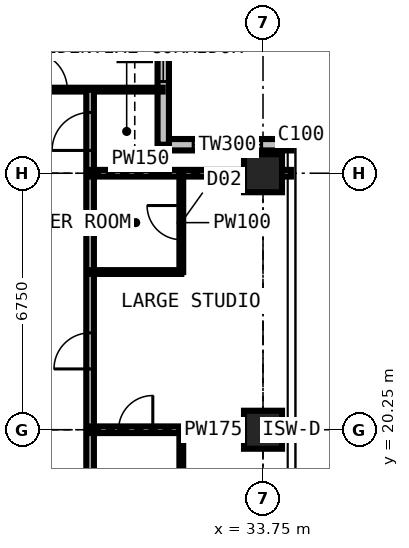
"""IFC4 building model, lengths in metres.
Left out: names, types, materials, properties, quantities, classifications, styles, units other than length and angle.
Written with IfcOpenShell. Run it as: python <this file> out.ifc"""

import sys

from ifc_helpers import new_model, si_unit, direction, frame, frame_2d, origin, origin_2d, place, context, subcontext, project, spatial, rectangle, extrude, element, fill, save


model = new_model("IFC4")
c1 = context("Model", 3, precision=1e-05, world=origin(), true_north=direction((0.0, 1.0)))
c2 = subcontext(c1, "Body", "Model", "MODEL_VIEW")
j1 = project(units=[si_unit("LENGTHUNIT", "METRE"), si_unit("PLANEANGLEUNIT", "RADIAN")], contexts=[c1])
p1 = place(None, origin())
s1 = spatial("IfcSite", under=j1, at=p1, CompositionType="ELEMENT")
p2 = place(p1, origin())
s2 = spatial("IfcBuilding", under=s1, at=p2, CompositionType="ELEMENT")
p3 = place(p2, frame((0.0, 0.0, 236.7)))
s3 = spatial("IfcBuildingStorey", under=s2, at=p3, CompositionType="ELEMENT", Elevation=236.7)
p4 = place(p3, frame((30.375, 30.375, 0.0), z_axis=(0.0, 0.0, 1.0), x_axis=(1.0, 0.0, 0.0)))
e1 = element("IfcColumn", 1, at=p4, inside=s3, PredefinedType="COLUMN", context=c2, shape_type="SweptSolid", body=[
    extrude(rectangle(XDim=0.8, YDim=0.8, at=origin_2d()), origin(), (0.0, 0.0, 1.0), 3.6),
])
for number, where, z_axis, x_axis in (
    (2, (33.75, 20.25, 0.0), (0.0, 0.0, 1.0), (1.0, 0.0, 0.0)),
    (3, (33.75, 27.0, 0.0), (0.0, 0.0, 1.0), (1.0, 0.0, 0.0)),
):
    element("IfcColumn", number, at=place(p3, frame(where, z_axis=z_axis, x_axis=x_axis)), inside=s3, PredefinedType="COLUMN", context=c2, shape_type="SweptSolid", body=[
        extrude(rectangle(XDim=1.0, YDim=1.0, at=origin_2d()), origin(), (0.0, 0.0, 1.0), 3.6),
    ])
p5 = place(p3, frame((34.5, 27.75, 0.0), z_axis=(0.0, 0.0, 1.0), x_axis=(-1.0, 0.0, 0.0)))
e4 = element("IfcWall", 4, at=p5, inside=s3, PredefinedType="SOLIDWALL", context=c2, shape_type="SweptSolid", body=[
    extrude(rectangle(XDim=3.375, YDim=0.3, at=frame_2d((1.688, 0.0))), origin(), (0.0, 0.0, 1.0), 3.375),
])
p6 = place(p5, frame((0.788, 0.0, 0.6)))
e5 = element("IfcOpeningElement", 5, at=p6, cuts=e4, PredefinedType="OPENING", context=c2, shape_type="SweptSolid", body=[
    extrude(rectangle(XDim=1.8, YDim=2.1, at=frame_2d((0.9, 1.05))), frame((0.0, 0.16, 0.0), z_axis=(0.0, -1.0, 0.0), x_axis=(1.0, 0.0, 0.0)), (0.0, 0.0, 1.0), 0.32),
])
p7 = place(p3, frame((31.125, 27.75, 0.0), z_axis=(0.0, 0.0, 1.0), x_axis=(0.0, 1.0, 0.0)))
e6 = element("IfcWall", 6, at=p7, inside=s3, PredefinedType="SOLIDWALL", context=c2, shape_type="SweptSolid", body=[
    extrude(rectangle(XDim=3.375, YDim=0.3, at=frame_2d((1.688, 0.0))), origin(), (0.0, 0.0, 1.0), 3.375),
])
p8 = place(p7, frame((1.663, 0.0, 0.9)))
e7 = element("IfcOpeningElement", 7, at=p8, cuts=e6, PredefinedType="OPENING", context=c2, shape_type="SweptSolid", body=[
    extrude(rectangle(XDim=1.5, YDim=1.8, at=frame_2d((0.75, 0.9))), frame((0.0, 0.16, 0.0), z_axis=(0.0, -1.0, 0.0), x_axis=(1.0, 0.0, 0.0)), (0.0, 0.0, 1.0), 0.32),
])
p9 = place(p3, frame((11.3, 29.2, 0.0), z_axis=(0.0, 0.0, 1.0), x_axis=(1.0, 0.0, 0.0)))
e8 = element("IfcWall", 8, at=p9, inside=s3, PredefinedType="PARTITIONING", context=c2, shape_type="SweptSolid", body=[
    extrude(rectangle(XDim=19.809, YDim=0.1, at=frame_2d((9.904, 0.0))), origin(), (0.0, 0.0, 1.0), 3.375),
])
p10 = place(p9, frame((16.3, 0.0, 0.0)))
e9 = element("IfcOpeningElement", 9, at=p10, cuts=e8, PredefinedType="OPENING", context=c2, shape_type="SweptSolid", body=[
    extrude(rectangle(XDim=1.0, YDim=2.2, at=frame_2d((0.5, 1.1))), frame((0.0, 0.06, 0.0), z_axis=(0.0, -1.0, 0.0), x_axis=(1.0, 0.0, 0.0)), (0.0, 0.0, 1.0), 0.12),
])
p11 = place(p9, frame((6.4, 0.0, 0.0)))
e10 = element("IfcOpeningElement", 10, at=p11, cuts=e8, PredefinedType="OPENING", context=c2, shape_type="SweptSolid", body=[
    extrude(rectangle(XDim=0.95, YDim=2.2, at=frame_2d((0.475, 1.1))), frame((0.0, 0.06, 0.0), z_axis=(0.0, -1.0, 0.0), x_axis=(1.0, 0.0, 0.0)), (0.0, 0.0, 1.0), 0.12),
])
p12 = place(p9, frame((13.15, 0.0, 0.0)))
e11 = element("IfcOpeningElement", 11, at=p12, cuts=e8, PredefinedType="OPENING", context=c2, shape_type="SweptSolid", body=[
    extrude(rectangle(XDim=0.95, YDim=2.2, at=frame_2d((0.475, 1.1))), frame((0.0, 0.06, 0.0), z_axis=(0.0, -1.0, 0.0), x_axis=(1.0, 0.0, 0.0)), (0.0, 0.0, 1.0), 0.12),
])
p13 = place(p9, frame((0.6, 0.0, 0.0)))
e12 = element("IfcOpeningElement", 12, at=p13, cuts=e8, PredefinedType="OPENING", context=c2, shape_type="SweptSolid", body=[
    extrude(rectangle(XDim=1.0, YDim=2.2, at=frame_2d((0.5, 1.1))), frame((0.0, 0.06, 0.0), z_axis=(0.0, -1.0, 0.0), x_axis=(1.0, 0.0, 0.0)), (0.0, 0.0, 1.0), 0.12),
])
p14 = place(p3, frame((29.2, 11.3, 0.0), z_axis=(0.0, 0.0, 1.0), x_axis=(0.0, 1.0, 0.0)))
e13 = element("IfcWall", 13, at=p14, inside=s3, PredefinedType="PARTITIONING", context=c2, shape_type="SweptSolid", body=[
    extrude(rectangle(XDim=17.9, YDim=0.2, at=frame_2d((8.95, 0.0))), origin(), (0.0, 0.0, 1.0), 3.375),
])
p15 = place(p14, frame((0.6, 0.0, 0.0)))
e14 = element("IfcOpeningElement", 14, at=p15, cuts=e13, PredefinedType="OPENING", context=c2, shape_type="SweptSolid", body=[
    extrude(rectangle(XDim=1.0, YDim=2.2, at=frame_2d((0.5, 1.1))), frame((0.0, 0.11, 0.0), z_axis=(0.0, -1.0, 0.0), x_axis=(1.0, 0.0, 0.0)), (0.0, 0.0, 1.0), 0.22),
])
p16 = place(p14, frame((10.55, 0.0, 0.0)))
e15 = element("IfcOpeningElement", 15, at=p16, cuts=e13, PredefinedType="OPENING", context=c2, shape_type="SweptSolid", body=[
    extrude(rectangle(XDim=0.95, YDim=2.2, at=frame_2d((0.475, 1.1))), frame((0.0, 0.11, 0.0), z_axis=(0.0, -1.0, 0.0), x_axis=(1.0, 0.0, 0.0)), (0.0, 0.0, 1.0), 0.22),
])
p17 = place(p14, frame((3.8, 0.0, 0.0)))
e16 = element("IfcOpeningElement", 16, at=p17, cuts=e13, PredefinedType="OPENING", context=c2, shape_type="SweptSolid", body=[
    extrude(rectangle(XDim=0.95, YDim=2.2, at=frame_2d((0.475, 1.1))), frame((0.0, 0.11, 0.0), z_axis=(0.0, -1.0, 0.0), x_axis=(1.0, 0.0, 0.0)), (0.0, 0.0, 1.0), 0.22),
])
p18 = place(p14, frame((16.3, 0.0, 0.0)))
e17 = element("IfcOpeningElement", 17, at=p18, cuts=e13, PredefinedType="OPENING", context=c2, shape_type="SweptSolid", body=[
    extrude(rectangle(XDim=1.0, YDim=2.2, at=frame_2d((0.5, 1.1))), frame((0.0, 0.11, 0.0), z_axis=(0.0, -1.0, 0.0), x_axis=(1.0, 0.0, 0.0)), (0.0, 0.0, 1.0), 0.22),
])
p19 = place(p3, frame((29.2, 20.25, 0.0), z_axis=(0.0, 0.0, 1.0), x_axis=(1.0, 0.0, 0.0)))
e18 = element("IfcWall", 18, at=p19, inside=s3, PredefinedType="PARTITIONING", context=c2, shape_type="SweptSolid", body=[
    extrude(rectangle(XDim=5.284, YDim=0.175, at=frame_2d((2.642, 0.0))), origin(), (0.0, 0.0, 1.0), 2.877),
])
p20 = place(p19, frame((0.75, 0.0, 0.0)))
e19 = element("IfcOpeningElement", 19, at=p20, cuts=e18, PredefinedType="OPENING", context=c2, shape_type="SweptSolid", body=[
    extrude(rectangle(XDim=0.9, YDim=2.2, at=frame_2d((0.45, 1.1))), frame((0.0, 0.097, 0.0), z_axis=(0.0, -1.0, 0.0), x_axis=(1.0, 0.0, 0.0)), (0.0, 0.0, 1.0), 0.195),
])
p21 = place(p3, frame((29.2, 24.4, 0.0), z_axis=(0.0, 0.0, 1.0), x_axis=(1.0, 0.0, 0.0)))
e20 = element("IfcWall", 20, at=p21, inside=s3, PredefinedType="PARTITIONING", context=c2, shape_type="SweptSolid", body=[
    extrude(rectangle(XDim=2.4, YDim=0.1, at=frame_2d((1.2, 0.0))), origin(), (0.0, 0.0, 1.0), 3.375),
])
p22 = place(p3, frame((29.2, 27.0, 0.0), z_axis=(0.0, 0.0, 1.0), x_axis=(1.0, 0.0, 0.0)))
e21 = element("IfcWall", 21, at=p22, inside=s3, PredefinedType="PARTITIONING", context=c2, shape_type="SweptSolid", body=[
    extrude(rectangle(XDim=5.284, YDim=0.175, at=frame_2d((2.642, 0.0))), origin(), (0.0, 0.0, 1.0), 2.877),
])
p23 = place(p3, frame((31.125, 27.0, 0.0), z_axis=(0.0, 0.0, 1.0), x_axis=(0.0, 1.0, 0.0)))
e22 = element("IfcWall", 22, at=p23, inside=s3, PredefinedType="PARTITIONING", context=c2, shape_type="SweptSolid", body=[
    extrude(rectangle(XDim=0.734, YDim=0.15, at=frame_2d((0.367, 0.0))), origin(), (0.0, 0.0, 1.0), 3.375),
])
p24 = place(p3, frame((31.6, 17.65, 0.0), z_axis=(0.0, 0.0, 1.0), x_axis=(0.0, 1.0, 0.0)))
e23 = element("IfcWall", 23, at=p24, inside=s3, PredefinedType="PARTITIONING", context=c2, shape_type="SweptSolid", body=[
    extrude(rectangle(XDim=2.6, YDim=0.1, at=frame_2d((1.3, 0.0))), origin(), (0.0, 0.0, 1.0), 3.375),
])
p25 = place(p3, frame((31.6, 24.4, 0.0), z_axis=(0.0, 0.0, 1.0), x_axis=(0.0, 1.0, 0.0)))
e24 = element("IfcWall", 24, at=p25, inside=s3, PredefinedType="PARTITIONING", context=c2, shape_type="SweptSolid", body=[
    extrude(rectangle(XDim=2.6, YDim=0.1, at=frame_2d((1.3, 0.0))), origin(), (0.0, 0.0, 1.0), 3.375),
])
p26 = place(p25, frame((0.85, 0.0, 0.0)))
e25 = element("IfcOpeningElement", 25, at=p26, cuts=e24, PredefinedType="OPENING", context=c2, shape_type="SweptSolid", body=[
    extrude(rectangle(XDim=0.9, YDim=2.2, at=frame_2d((0.45, 1.1))), frame((0.0, 0.06, 0.0), z_axis=(0.0, -1.0, 0.0), x_axis=(1.0, 0.0, 0.0)), (0.0, 0.0, 1.0), 0.12),
])
p27 = place(p6, origin())
e26 = element("IfcWindow", 26, at=p27, inside=s3, PartitioningType="SINGLE_PANEL", PredefinedType="WINDOW", context=c2, shape_type="SweptSolid", body=[
    extrude(rectangle(XDim=1.8, YDim=2.1, at=frame_2d((0.9, 1.05))), frame((0.0, 0.03, 0.0), z_axis=(0.0, -1.0, 0.0), x_axis=(1.0, 0.0, 0.0)), (0.0, 0.0, 1.0), 0.06),
])
fill(e5, e26)
p28 = place(p8, origin())
e27 = element("IfcWindow", 27, at=p28, inside=s3, PartitioningType="SINGLE_PANEL", PredefinedType="WINDOW", context=c2, shape_type="SweptSolid", body=[
    extrude(rectangle(XDim=1.5, YDim=1.8, at=frame_2d((0.75, 0.9))), frame((0.0, 0.03, 0.0), z_axis=(0.0, -1.0, 0.0), x_axis=(1.0, 0.0, 0.0)), (0.0, 0.0, 1.0), 0.06),
])
fill(e7, e27)
p29 = place(p16, origin())
e28 = element("IfcDoor", 28, at=p29, inside=s3, OperationType="SINGLE_SWING_LEFT", PredefinedType="DOOR", context=c2, shape_type="SweptSolid", body=[
    extrude(rectangle(XDim=0.95, YDim=2.2, at=frame_2d((0.475, 1.1))), frame((0.0, 0.025, 0.0), z_axis=(0.0, -1.0, 0.0), x_axis=(1.0, 0.0, 0.0)), (0.0, 0.0, 1.0), 0.05),
])
fill(e15, e28)
p30 = place(p26, origin())
e29 = element("IfcDoor", 29, at=p30, inside=s3, OperationType="SINGLE_SWING_RIGHT", PredefinedType="DOOR", context=c2, shape_type="SweptSolid", body=[
    extrude(rectangle(XDim=0.9, YDim=2.2, at=frame_2d((0.45, 1.1))), frame((0.0, 0.025, 0.0), z_axis=(0.0, -1.0, 0.0), x_axis=(1.0, 0.0, 0.0)), (0.0, 0.0, 1.0), 0.05),
])
fill(e25, e29)
p31 = place(p20, origin())
e30 = element("IfcDoor", 30, at=p31, inside=s3, OperationType="SINGLE_SWING_RIGHT", PredefinedType="DOOR", context=c2, shape_type="SweptSolid", body=[
    extrude(rectangle(XDim=0.9, YDim=2.2, at=frame_2d((0.45, 1.1))), frame((0.0, 0.025, 0.0), z_axis=(0.0, -1.0, 0.0), x_axis=(1.0, 0.0, 0.0)), (0.0, 0.0, 1.0), 0.05),
])
fill(e19, e30)
p32 = place(p18, origin())
e31 = element("IfcDoor", 31, at=p32, inside=s3, OperationType="SINGLE_SWING_LEFT", PredefinedType="DOOR", context=c2, shape_type="SweptSolid", body=[
    extrude(rectangle(XDim=1.0, YDim=2.2, at=frame_2d((0.5, 1.1))), frame((0.0, 0.025, 0.0), z_axis=(0.0, -1.0, 0.0), x_axis=(1.0, 0.0, 0.0)), (0.0, 0.0, 1.0), 0.05),
])
fill(e17, e31)
p33 = place(p10, origin())
e32 = element("IfcDoor", 32, at=p33, inside=s3, OperationType="SINGLE_SWING_LEFT", PredefinedType="DOOR", context=c2, shape_type="SweptSolid", body=[
    extrude(rectangle(XDim=1.0, YDim=2.2, at=frame_2d((0.5, 1.1))), frame((0.0, 0.025, 0.0), z_axis=(0.0, -1.0, 0.0), x_axis=(1.0, 0.0, 0.0)), (0.0, 0.0, 1.0), 0.05),
])
fill(e9, e32)
save(model, sys.argv[1])
